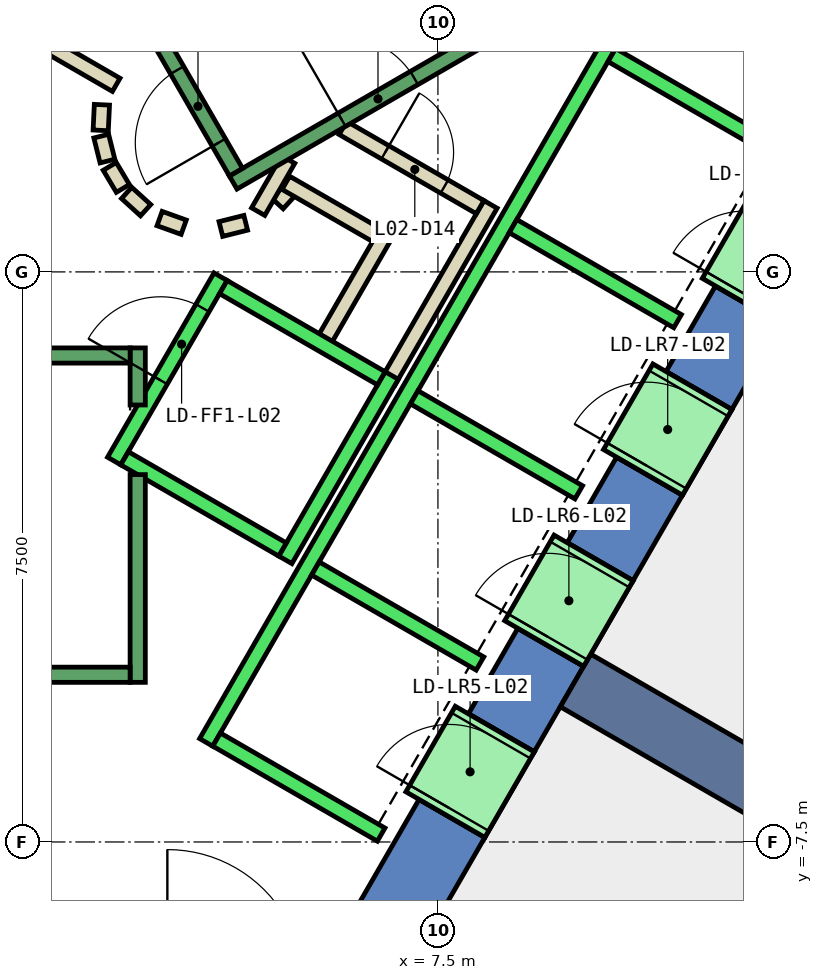
"""IFC4 building model, lengths in metres.
Left out: names, types, materials, properties, quantities, classifications, styles, units other than length and angle.
Written with IfcOpenShell. Run it as: python <this file> out.ifc"""

import sys

from ifc_helpers import new_model, si_unit, direction, frame, frame_2d, origin, place, context, subcontext, project, spatial, polyline, rectangle, outline, extrude, element, fill, save


model = new_model("IFC4")
c1 = context("Model", 3, precision=1e-05, world=origin(), true_north=direction((0.0, 1.0)))
c2 = subcontext(c1, "Body", "Model", "MODEL_VIEW")
j1 = project(units=[si_unit("LENGTHUNIT", "METRE"), si_unit("PLANEANGLEUNIT", "RADIAN")], contexts=[c1])
p1 = place(None, origin())
s1 = spatial("IfcSite", under=j1, at=p1, CompositionType="ELEMENT")
p2 = place(p1, origin())
s2 = spatial("IfcBuilding", under=s1, at=p2, CompositionType="ELEMENT")
p3 = place(p2, frame((0.0, 0.0, 15.0)))
s3 = spatial("IfcBuildingStorey", under=s2, at=p3, CompositionType="ELEMENT", Elevation=15.0)
p4 = place(p3, frame((0.0, 0.0, -0.45)))
e1 = element("IfcWall", 1, at=p4, inside=s3, PredefinedType="SHEAR", context=c2, shape_type="SweptSolid", body=[
    extrude(outline(polyline([(8.517, 11.748), (7.651, 11.248), (12.702, 2.5), (13.856, 2.5), (8.517, 11.748)])), origin(), (0.0, 0.0, 1.0), 5.0),
])
p5 = place(p3, frame((0.0, 0.0, -0.45)))
e2 = element("IfcWall", 2, at=p5, inside=s3, PredefinedType="SHEAR", context=c2, shape_type="SweptSolid", body=[
    extrude(outline(polyline([(8.117, -7.44), (7.252, -6.94), (6.351, -8.5), (6.928, -9.5), (8.117, -7.44)])), origin(), (0.0, 0.0, 1.0), 5.0),
])
p6 = place(p3, frame((0.0, 0.0, -0.45)))
e3 = element("IfcWall", 3, at=p6, inside=s3, PredefinedType="SHEAR", context=c2, shape_type="SweptSolid", body=[
    extrude(outline(polyline([(9.417, -5.189), (8.551, -4.689), (7.902, -5.814), (8.767, -6.314), (9.417, -5.189)])), origin(), (0.0, 0.0, 1.0), 5.0),
])
p7 = place(p3, frame((0.0, 0.0, -0.45)))
e4 = element("IfcWall", 4, at=p7, inside=s3, PredefinedType="SHEAR", context=c2, shape_type="SweptSolid", body=[
    extrude(outline(polyline([(10.717, -2.937), (9.851, -2.437), (9.201, -3.563), (10.067, -4.063), (10.717, -2.937)])), origin(), (0.0, 0.0, 1.0), 5.0),
])
p8 = place(p3, frame((0.0, 0.0, -0.45)))
e5 = element("IfcWall", 5, at=p8, inside=s3, PredefinedType="SHEAR", context=c2, shape_type="SweptSolid", body=[
    extrude(outline(polyline([(12.017, -0.686), (11.151, -0.186), (10.501, -1.311), (11.367, -1.811), (12.017, -0.686)])), origin(), (0.0, 0.0, 1.0), 5.0),
])
p9 = place(p3, frame((0.0, 0.0, 3.6)))
e6 = element("IfcWall", 6, at=p9, inside=s3, PredefinedType="SHEAR", context=c2, shape_type="SweptSolid", body=[
    extrude(outline(polyline([(8.767, -6.314), (7.902, -5.814), (7.252, -6.94), (8.117, -7.44), (8.767, -6.314)])), origin(), (0.0, 0.0, 1.0), 0.95),
])
p10 = place(p3, frame((0.0, 0.0, 3.6)))
e7 = element("IfcWall", 7, at=p10, inside=s3, PredefinedType="SHEAR", context=c2, shape_type="SweptSolid", body=[
    extrude(outline(polyline([(10.067, -4.063), (9.201, -3.563), (8.551, -4.689), (9.417, -5.189), (10.067, -4.063)])), origin(), (0.0, 0.0, 1.0), 0.95),
])
p11 = place(p3, frame((0.0, 0.0, 3.6)))
e8 = element("IfcWall", 8, at=p11, inside=s3, PredefinedType="SHEAR", context=c2, shape_type="SweptSolid", body=[
    extrude(outline(polyline([(11.367, -1.811), (10.501, -1.311), (9.851, -2.437), (10.717, -2.937), (11.367, -1.811)])), origin(), (0.0, 0.0, 1.0), 0.95),
])
p12 = place(p3, frame((0.0, 0.0, 3.6)))
e9 = element("IfcWall", 9, at=p12, inside=s3, PredefinedType="SHEAR", context=c2, shape_type="SweptSolid", body=[
    extrude(outline(polyline([(12.667, 0.44), (11.801, 0.94), (11.151, -0.186), (12.017, -0.686), (12.667, 0.44)])), origin(), (0.0, 0.0, 1.0), 0.95),
])
p13 = place(p3, frame((9.31, -5.375, -0.45), z_axis=(0.0, 0.0, 1.0), x_axis=(0.866017533419, -0.500013631625, 0.0)))
e10 = element("IfcWall", 10, at=p13, inside=s3, PredefinedType="SHEAR", context=c2, shape_type="SweptSolid", body=[
    extrude(rectangle(XDim=9.0, YDim=0.8, at=frame_2d((4.5, 0.0))), origin(), (0.0, 0.0, 1.0), 5.0),
])
p14 = place(p3, frame((5.39, 0.898, 0.0), z_axis=(0.0, 0.0, 1.0), x_axis=(0.673828488714, 0.738887791073, 0.0)))
e11 = element("IfcWall", 11, at=p14, inside=s3, PredefinedType="PARTITIONING", context=c2, shape_type="SweptSolid", body=[
    extrude(rectangle(XDim=0.263, YDim=0.2, at=frame_2d((0.131, 0.0))), origin(), (0.0, 0.0, 1.0), 4.55),
])
p15 = place(p3, frame((5.499, 1.172, 0.0), z_axis=(0.0, 0.0, 1.0), x_axis=(0.866333505267, -0.499465972466, 0.0)))
e12 = element("IfcWall", 12, at=p15, inside=s3, PredefinedType="PARTITIONING", context=c2, shape_type="SweptSolid", body=[
    extrude(rectangle(XDim=1.374, YDim=0.2, at=frame_2d((0.687, 0.0))), origin(), (0.0, 0.0, 1.0), 4.55),
])
p16 = place(p3, frame((6.826, 0.522, 0.0), z_axis=(0.0, 0.0, 1.0), x_axis=(-0.500016722714, -0.866015748706, 0.0)))
e13 = element("IfcWall", 13, at=p16, inside=s3, PredefinedType="PARTITIONING", context=c2, shape_type="SweptSolid", body=[
    extrude(rectangle(XDim=1.7, YDim=0.2, at=frame_2d((0.85, 0.0))), origin(), (0.0, 0.0, 1.0), 4.55),
])
p17 = place(p3, frame((8.192, 0.888, 0.0), z_axis=(0.0, 0.0, 1.0), x_axis=(-0.499940625693, -0.866059680843, 0.0)))
e14 = element("IfcWall", 14, at=p17, inside=s3, PredefinedType="PARTITIONING", context=c2, shape_type="SweptSolid", body=[
    extrude(rectangle(XDim=2.68, YDim=0.2, at=frame_2d((1.34, 0.0))), origin(), (0.0, 0.0, 1.0), 4.55),
])
p18 = place(p3, frame((5.135, 0.793, 0.0), z_axis=(0.0, 0.0, 1.0), x_axis=(0.499526442893, 0.866298639529, 0.0)))
e15 = element("IfcWall", 15, at=p18, inside=s3, PredefinedType="PARTITIONING", context=c2, shape_type="SweptSolid", body=[
    extrude(rectangle(XDim=0.791, YDim=0.2, at=frame_2d((0.396, 0.0))), origin(), (0.0, 0.0, 1.0), 4.55),
])
p19 = place(p3, frame((6.25, 1.894, 0.0), z_axis=(0.0, 0.0, 1.0), x_axis=(0.866043184279, -0.499969202016, 0.0)))
e16 = element("IfcWall", 16, at=p19, inside=s3, PredefinedType="PARTITIONING", context=c2, shape_type="SweptSolid", body=[
    extrude(rectangle(XDim=2.084, YDim=0.2, at=frame_2d((1.042, 0.0))), origin(), (0.0, 0.0, 1.0), 4.55),
])
p20 = place(p19, frame((0.642, 0.0, 0.0)))
e17 = element("IfcOpeningElement", 17, at=p20, cuts=e16, PredefinedType="OPENING", context=c2, shape_type="SweptSolid", body=[
    extrude(rectangle(XDim=0.9, YDim=2.1, at=frame_2d((0.45, 1.05))), frame((0.0, 0.11, 0.0), z_axis=(0.0, -1.0, 0.0), x_axis=(1.0, 0.0, 0.0)), (0.0, 0.0, 1.0), 0.22),
])
p21 = place(p3, frame((3.079, 2.199, 0.0), z_axis=(0.0, 0.0, 1.0), x_axis=(-0.047771483479, -0.998858290933, 0.0)))
e18 = element("IfcWall", 18, at=p21, inside=s3, PredefinedType="PARTITIONING", context=c2, shape_type="SweptSolid", body=[
    extrude(rectangle(XDim=0.337, YDim=0.2, at=frame_2d((0.169, 0.0))), origin(), (0.0, 0.0, 1.0), 4.55),
])
p22 = place(p3, frame((3.07, 1.786, 0.0), z_axis=(0.0, 0.0, 1.0), x_axis=(0.242705583207, -0.970099994784, 0.0)))
e19 = element("IfcWall", 19, at=p22, inside=s3, PredefinedType="PARTITIONING", context=c2, shape_type="SweptSolid", body=[
    extrude(rectangle(XDim=0.338, YDim=0.2, at=frame_2d((0.169, 0.0))), origin(), (0.0, 0.0, 1.0), 4.55),
])
for number, where, z_axis, x_axis in (
    (20, (3.182, 1.388, 0.0), (0.0, 0.0, 1.0), (0.512, -0.859, 0.0)),
    (21, (3.404, 1.039, 0.0), (0.0, 0.0, 1.0), (0.74, -0.672, 0.0)),
):
    element("IfcWall", number, at=place(p3, frame(where, z_axis=z_axis, x_axis=x_axis)), inside=s3, PredefinedType="PARTITIONING", context=c2, shape_type="SweptSolid", body=[
        extrude(rectangle(XDim=0.338, YDim=0.2, at=frame_2d((0.169, 0.0))), origin(), (0.0, 0.0, 1.0), 4.55),
    ])
p23 = place(p3, frame((3.838, 0.702, 0.0), z_axis=(0.0, 0.0, 1.0), x_axis=(0.941035081519, -0.338308993895, 0.0)))
e22 = element("IfcWall", 22, at=p23, inside=s3, PredefinedType="PARTITIONING", context=c2, shape_type="SweptSolid", body=[
    extrude(rectangle(XDim=0.337, YDim=0.2, at=frame_2d((0.168, 0.0))), origin(), (0.0, 0.0, 1.0), 4.55),
])
p24 = place(p3, frame((4.644, 0.564, 0.0), z_axis=(0.0, 0.0, 1.0), x_axis=(0.969929076366, 0.243387729394, 0.0)))
e23 = element("IfcWall", 23, at=p24, inside=s3, PredefinedType="PARTITIONING", context=c2, shape_type="SweptSolid", body=[
    extrude(rectangle(XDim=0.337, YDim=0.2, at=frame_2d((0.168, 0.0))), origin(), (0.0, 0.0, 1.0), 4.55),
])
p25 = place(p3, frame((2.012, 3.186, 0.0), z_axis=(0.0, 0.0, 1.0), x_axis=(0.865891012941, -0.500232699559, 0.0)))
e24 = element("IfcWall", 24, at=p25, inside=s3, PredefinedType="PARTITIONING", context=c2, shape_type="SweptSolid", body=[
    extrude(rectangle(XDim=1.449, YDim=0.2, at=frame_2d((0.725, 0.0))), origin(), (0.0, 0.0, 1.0), 4.55),
])
p26 = place(p3, frame((3.24, -2.488, 0.0), z_axis=(0.0, 0.0, 1.0), x_axis=(0.49994636267, 0.866056369097, 0.0)))
e25 = element("IfcWall", 25, at=p26, inside=s3, PredefinedType="STANDARD", context=c2, shape_type="SweptSolid", body=[
    extrude(rectangle(XDim=2.8, YDim=0.2, at=frame_2d((1.4, 0.0))), origin(), (0.0, 0.0, 1.0), 4.55),
])
p27 = place(p26, frame((1.225, 0.0, 0.0)))
e26 = element("IfcOpeningElement", 26, at=p27, cuts=e25, PredefinedType="OPENING", context=c2, shape_type="SweptSolid", body=[
    extrude(rectangle(XDim=1.1, YDim=2.1, at=frame_2d((0.55, 1.05))), frame((0.0, 0.11, 0.0), z_axis=(0.0, -1.0, 0.0), x_axis=(1.0, 0.0, 0.0)), (0.0, 0.0, 1.0), 0.22),
])
p28 = place(p3, frame((5.492, -3.788, 0.0), z_axis=(0.0, 0.0, 1.0), x_axis=(0.500011755427, 0.866018616679, 0.0)))
e27 = element("IfcWall", 27, at=p28, inside=s3, PredefinedType="STANDARD", context=c2, shape_type="SweptSolid", body=[
    extrude(rectangle(XDim=2.8, YDim=0.2, at=frame_2d((1.4, 0.0))), origin(), (0.0, 0.0, 1.0), 4.55),
])
p29 = place(p3, frame((3.377, -2.452, 0.0), z_axis=(0.0, 0.0, 1.0), x_axis=(0.865955154139, -0.50012165622, 0.0)))
e28 = element("IfcWall", 28, at=p29, inside=s3, PredefinedType="STANDARD", context=c2, shape_type="SweptSolid", body=[
    extrude(rectangle(XDim=2.4, YDim=0.2, at=frame_2d((1.2, 0.0))), origin(), (0.0, 0.0, 1.0), 4.55),
])
p30 = place(p3, frame((4.677, -0.2, 0.0), z_axis=(0.0, 0.0, 1.0), x_axis=(0.865973769406, -0.500089422704, 0.0)))
e29 = element("IfcWall", 29, at=p30, inside=s3, PredefinedType="STANDARD", context=c2, shape_type="SweptSolid", body=[
    extrude(rectangle(XDim=2.399, YDim=0.2, at=frame_2d((1.2, 0.0))), origin(), (0.0, 0.0, 1.0), 4.55),
])
p31 = place(p3, frame((4.451, -6.19, 0.0), z_axis=(0.0, 0.0, 1.0), x_axis=(0.50000090737, 0.866024879913, 0.0)))
e30 = element("IfcWall", 30, at=p31, inside=s3, PredefinedType="STANDARD", context=c2, shape_type="SweptSolid", body=[
    extrude(rectangle(XDim=10.6, YDim=0.2, at=frame_2d((5.3, 0.0))), origin(), (0.0, 0.0, 1.0), 4.55),
])
for number, where, z_axis, x_axis in (
    (31, (4.588, -6.153, 0.0), (0.0, 0.0, 1.0), (0.866, -0.5, 0.0)),
    (32, (5.888, -3.902, 0.0), (0.0, 0.0, 1.0), (0.866, -0.5, 0.0)),
    (33, (7.188, -1.65, 0.0), (0.0, 0.0, 1.0), (0.866, -0.5, 0.0)),
    (34, (8.488, 0.602, 0.0), (0.0, 0.0, 1.0), (0.866, -0.5, 0.0)),
):
    element("IfcWall", number, at=place(p3, frame(where, z_axis=z_axis, x_axis=x_axis)), inside=s3, PredefinedType="STANDARD", context=c2, shape_type="SweptSolid", body=[
        extrude(rectangle(XDim=2.5, YDim=0.2, at=frame_2d((1.25, 0.0))), origin(), (0.0, 0.0, 1.0), 4.55),
    ])
p32 = place(p3, frame((9.788, 2.853, 0.0), z_axis=(0.0, 0.0, 1.0), x_axis=(0.865998541277, -0.500046524342, 0.0)))
e35 = element("IfcWall", 35, at=p32, inside=s3, PredefinedType="STANDARD", context=c2, shape_type="SweptSolid", body=[
    extrude(rectangle(XDim=2.5, YDim=0.2, at=frame_2d((1.25, 0.0))), origin(), (0.0, 0.0, 1.0), 4.55),
])
p33 = place(p3, frame((7.598, -7.14, 0.0), z_axis=(0.0, 0.0, 1.0), x_axis=(0.500362116554, 0.865816234728, 0.0)))
e36 = element("IfcWall", 36, at=p33, inside=s3, PredefinedType="STANDARD", context=c2, shape_type="SweptSolid", body=[
    extrude(rectangle(XDim=1.299, YDim=1.2, at=frame_2d((0.65, 0.0))), origin(), (0.0, 0.0, 1.0), 2.4),
])
p34 = place(p33, frame((0.1, 0.0, 0.0)))
e37 = element("IfcOpeningElement", 37, at=p34, cuts=e36, PredefinedType="OPENING", context=c2, shape_type="SweptSolid", body=[
    extrude(rectangle(XDim=1.1, YDim=2.3, at=frame_2d((0.55, 1.15))), frame((0.0, 0.61, 0.0), z_axis=(0.0, -1.0, 0.0), x_axis=(1.0, 0.0, 0.0)), (0.0, 0.0, 1.0), 1.22),
])
p35 = place(p3, frame((8.898, -4.889, 0.0), z_axis=(0.0, 0.0, 1.0), x_axis=(0.500036693733, 0.866004217611, 0.0)))
e38 = element("IfcWall", 38, at=p35, inside=s3, PredefinedType="STANDARD", context=c2, shape_type="SweptSolid", body=[
    extrude(rectangle(XDim=1.3, YDim=1.2, at=frame_2d((0.65, 0.0))), origin(), (0.0, 0.0, 1.0), 2.4),
])
p36 = place(p35, frame((0.1, 0.0, 0.0)))
e39 = element("IfcOpeningElement", 39, at=p36, cuts=e38, PredefinedType="OPENING", context=c2, shape_type="SweptSolid", body=[
    extrude(rectangle(XDim=1.1, YDim=2.3, at=frame_2d((0.55, 1.15))), frame((0.0, 0.61, 0.0), z_axis=(0.0, -1.0, 0.0), x_axis=(1.0, 0.0, 0.0)), (0.0, 0.0, 1.0), 1.22),
])
p37 = place(p3, frame((10.198, -2.637, 0.0), z_axis=(0.0, 0.0, 1.0), x_axis=(0.49989585183, 0.866085525409, 0.0)))
e40 = element("IfcWall", 40, at=p37, inside=s3, PredefinedType="STANDARD", context=c2, shape_type="SweptSolid", body=[
    extrude(rectangle(XDim=1.3, YDim=1.2, at=frame_2d((0.65, 0.0))), origin(), (0.0, 0.0, 1.0), 2.4),
])
p38 = place(p37, frame((0.1, 0.0, 0.0)))
e41 = element("IfcOpeningElement", 41, at=p38, cuts=e40, PredefinedType="OPENING", context=c2, shape_type="SweptSolid", body=[
    extrude(rectangle(XDim=1.1, YDim=2.3, at=frame_2d((0.55, 1.15))), frame((0.0, 0.61, 0.0), z_axis=(0.0, -1.0, 0.0), x_axis=(1.0, 0.0, 0.0)), (0.0, 0.0, 1.0), 1.22),
])
p39 = place(p3, frame((11.498, -0.385, 0.0), z_axis=(0.0, 0.0, 1.0), x_axis=(0.500221244143, 0.865897630733, 0.0)))
e42 = element("IfcWall", 42, at=p39, inside=s3, PredefinedType="STANDARD", context=c2, shape_type="SweptSolid", body=[
    extrude(rectangle(XDim=1.299, YDim=1.2, at=frame_2d((0.65, 0.0))), origin(), (0.0, 0.0, 1.0), 2.4),
])
p40 = place(p39, frame((0.1, 0.0, 0.0)))
e43 = element("IfcOpeningElement", 43, at=p40, cuts=e42, PredefinedType="OPENING", context=c2, shape_type="SweptSolid", body=[
    extrude(rectangle(XDim=1.1, YDim=2.3, at=frame_2d((0.55, 1.15))), frame((0.0, 0.61, 0.0), z_axis=(0.0, -1.0, 0.0), x_axis=(1.0, 0.0, 0.0)), (0.0, 0.0, 1.0), 1.22),
])
p41 = place(p3, frame((3.55, -2.667, 0.0), z_axis=(0.0, 0.0, 1.0), x_axis=(0.0, -1.0, 0.0)))
e44 = element("IfcWall", 44, at=p41, inside=s3, PredefinedType="STANDARD", context=c2, shape_type="SweptSolid", body=[
    extrude(rectangle(XDim=2.733, YDim=0.2, at=frame_2d((1.366, 0.0))), origin(), (0.0, 0.0, 1.0), 4.55),
])
p42 = place(p3, frame((3.55, -1.0, 0.0), z_axis=(0.0, 0.0, 1.0), x_axis=(0.0, -1.0, 0.0)))
e45 = element("IfcWall", 45, at=p42, inside=s3, PredefinedType="STANDARD", context=c2, shape_type="SweptSolid", body=[
    extrude(rectangle(XDim=0.751, YDim=0.2, at=frame_2d((0.375, 0.0))), origin(), (0.0, 0.0, 1.0), 4.55),
])
p43 = place(p3, frame((-3.45, -1.1, 0.0), z_axis=(0.0, 0.0, 1.0), x_axis=(1.0, 0.0, 0.0)))
e46 = element("IfcWall", 46, at=p43, inside=s3, PredefinedType="STANDARD", context=c2, shape_type="SweptSolid", body=[
    extrude(rectangle(XDim=6.9, YDim=0.2, at=frame_2d((3.45, 0.0))), origin(), (0.0, 0.0, 1.0), 4.55),
])
p44 = place(p43, frame((0.45, 0.0, 0.0)))
e47 = element("IfcOpeningElement", 47, at=p44, cuts=e46, PredefinedType="OPENING", context=c2, shape_type="SweptSolid", body=[
    extrude(rectangle(XDim=1.1, YDim=2.2, at=frame_2d((0.55, 1.1))), frame((0.0, 0.11, 0.0), z_axis=(0.0, -1.0, 0.0), x_axis=(1.0, 0.0, 0.0)), (0.0, 0.0, 1.0), 0.22),
])
p45 = place(p3, frame((-3.45, -5.3, 0.0), z_axis=(0.0, 0.0, 1.0), x_axis=(1.0, 0.0, 0.0)))
e48 = element("IfcWall", 48, at=p45, inside=s3, PredefinedType="STANDARD", context=c2, shape_type="SweptSolid", body=[
    extrude(rectangle(XDim=6.9, YDim=0.2, at=frame_2d((3.45, 0.0))), origin(), (0.0, 0.0, 1.0), 4.55),
])
p46 = place(p3, frame((4.806, 1.176, 0.0), z_axis=(0.0, 0.0, 1.0), x_axis=(0.866059941101, 0.499940174841, 0.0)))
e49 = element("IfcWall", 49, at=p46, inside=s3, PredefinedType="STANDARD", context=c2, shape_type="SweptSolid", body=[
    extrude(rectangle(XDim=4.4, YDim=0.2, at=frame_2d((2.2, 0.0))), origin(), (0.0, 0.0, 1.0), 4.55),
])
p47 = place(p46, frame((1.65, 0.0, 0.0)))
e50 = element("IfcOpeningElement", 50, at=p47, cuts=e49, PredefinedType="OPENING", context=c2, shape_type="SweptSolid", body=[
    extrude(rectangle(XDim=1.1, YDim=2.2, at=frame_2d((0.55, 1.1))), frame((0.0, 0.11, 0.0), z_axis=(0.0, -1.0, 0.0), x_axis=(1.0, 0.0, 0.0)), (0.0, 0.0, 1.0), 0.22),
])
p48 = place(p3, frame((4.843, 1.312, 0.0), z_axis=(0.0, 0.0, 1.0), x_axis=(-0.499963383562, 0.866046543262, 0.0)))
e51 = element("IfcWall", 51, at=p48, inside=s3, PredefinedType="STANDARD", context=c2, shape_type="SweptSolid", body=[
    extrude(rectangle(XDim=6.9, YDim=0.2, at=frame_2d((3.45, 0.0))), origin(), (0.0, 0.0, 1.0), 4.55),
])
p49 = place(p48, frame((0.45, 0.0, 0.0)))
e52 = element("IfcOpeningElement", 52, at=p49, cuts=e51, PredefinedType="OPENING", context=c2, shape_type="SweptSolid", body=[
    extrude(rectangle(XDim=1.1, YDim=2.2, at=frame_2d((0.55, 1.1))), frame((0.0, 0.11, 0.0), z_axis=(0.0, -1.0, 0.0), x_axis=(1.0, 0.0, 0.0)), (0.0, 0.0, 1.0), 0.22),
])
p50 = place(p20, origin())
e53 = element("IfcDoor", 53, at=p50, inside=s3, OperationType="SINGLE_SWING_LEFT", PredefinedType="DOOR", context=c2, shape_type="SweptSolid", body=[
    extrude(rectangle(XDim=0.9, YDim=2.1, at=frame_2d((0.45, 1.05))), frame((0.0, 0.025, 0.0), z_axis=(0.0, -1.0, 0.0), x_axis=(1.0, 0.0, 0.0)), (0.0, 0.0, 1.0), 0.05),
])
fill(e17, e53)
p51 = place(p34, origin())
e54 = element("IfcDoor", 54, at=p51, inside=s3, OperationType="SLIDING_TO_LEFT", PredefinedType="DOOR", context=c2, shape_type="SweptSolid", body=[
    extrude(rectangle(XDim=1.1, YDim=2.3, at=frame_2d((0.55, 1.15))), frame((0.0, 0.025, 0.0), z_axis=(0.0, -1.0, 0.0), x_axis=(1.0, 0.0, 0.0)), (0.0, 0.0, 1.0), 0.05),
])
fill(e37, e54)
p52 = place(p36, origin())
e55 = element("IfcDoor", 55, at=p52, inside=s3, OperationType="SLIDING_TO_LEFT", PredefinedType="DOOR", context=c2, shape_type="SweptSolid", body=[
    extrude(rectangle(XDim=1.1, YDim=2.3, at=frame_2d((0.55, 1.15))), frame((0.0, 0.025, 0.0), z_axis=(0.0, -1.0, 0.0), x_axis=(1.0, 0.0, 0.0)), (0.0, 0.0, 1.0), 0.05),
])
fill(e39, e55)
p53 = place(p38, origin())
e56 = element("IfcDoor", 56, at=p53, inside=s3, OperationType="SLIDING_TO_LEFT", PredefinedType="DOOR", context=c2, shape_type="SweptSolid", body=[
    extrude(rectangle(XDim=1.1, YDim=2.3, at=frame_2d((0.55, 1.15))), frame((0.0, 0.025, 0.0), z_axis=(0.0, -1.0, 0.0), x_axis=(1.0, 0.0, 0.0)), (0.0, 0.0, 1.0), 0.05),
])
fill(e41, e56)
p54 = place(p27, origin())
e57 = element("IfcDoor", 57, at=p54, inside=s3, OperationType="SLIDING_TO_LEFT", PredefinedType="DOOR", context=c2, shape_type="SweptSolid", body=[
    extrude(rectangle(XDim=1.1, YDim=2.1, at=frame_2d((0.55, 1.05))), frame((0.0, 0.025, 0.0), z_axis=(0.0, -1.0, 0.0), x_axis=(1.0, 0.0, 0.0)), (0.0, 0.0, 1.0), 0.05),
])
fill(e26, e57)
p55 = place(p49, origin())
e58 = element("IfcDoor", 58, at=p55, inside=s3, OperationType="SINGLE_SWING_LEFT", PredefinedType="DOOR", context=c2, shape_type="SweptSolid", body=[
    extrude(rectangle(XDim=1.1, YDim=2.2, at=frame_2d((0.55, 1.1))), frame((0.0, 0.025, 0.0), z_axis=(0.0, -1.0, 0.0), x_axis=(1.0, 0.0, 0.0)), (0.0, 0.0, 1.0), 0.05),
])
fill(e52, e58)
p56 = place(p47, origin())
e59 = element("IfcDoor", 59, at=p56, inside=s3, OperationType="SINGLE_SWING_LEFT", PredefinedType="DOOR", context=c2, shape_type="SweptSolid", body=[
    extrude(rectangle(XDim=1.1, YDim=2.2, at=frame_2d((0.55, 1.1))), frame((0.0, 0.025, 0.0), z_axis=(0.0, -1.0, 0.0), x_axis=(1.0, 0.0, 0.0)), (0.0, 0.0, 1.0), 0.05),
])
fill(e50, e59)
save(model, sys.argv[1])
